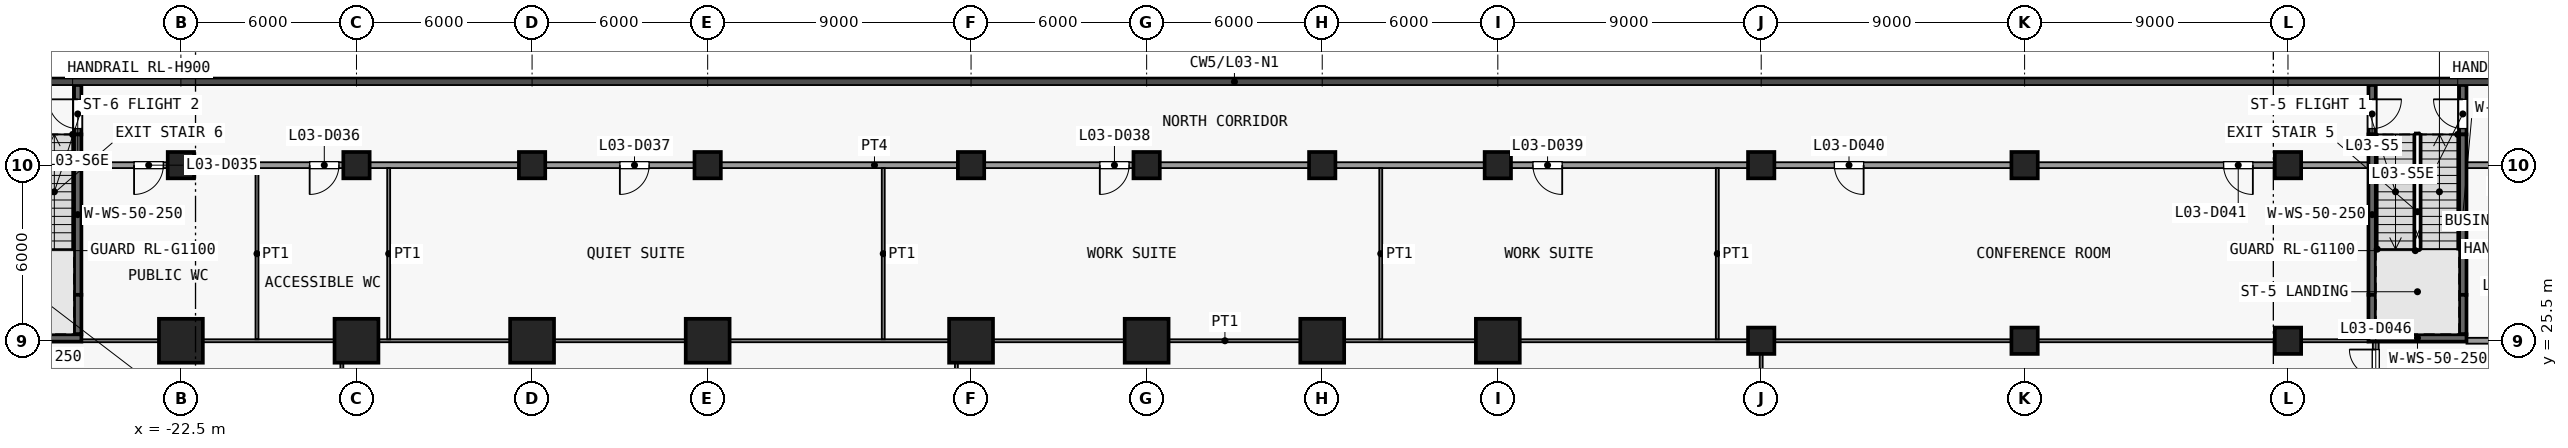
"""IFC4 building model, lengths in metres.
Left out: names, types, materials, properties, quantities, classifications, styles, units other than length and angle.
Written with IfcOpenShell. Run it as: python <this file> out.ifc"""

import sys

from ifc_helpers import new_model, si_unit, direction, frame, frame_2d, origin, origin_2d, place, context, subcontext, project, spatial, rectangle, extrude, element, fill, save


model = new_model("IFC4")
c1 = context("Model", 3, precision=1e-05, world=origin(), true_north=direction((0.0, 1.0)))
c2 = subcontext(c1, "Body", "Model", "MODEL_VIEW")
j1 = project(units=[si_unit("LENGTHUNIT", "METRE"), si_unit("PLANEANGLEUNIT", "RADIAN")], contexts=[c1])
p1 = place(None, origin())
s1 = spatial("IfcSite", under=j1, at=p1, CompositionType="ELEMENT")
p2 = place(p1, origin())
s2 = spatial("IfcBuilding", under=s1, at=p2, CompositionType="ELEMENT")
p3 = place(p2, frame((0.0, 0.0, 18.5)))
s3 = spatial("IfcBuildingStorey", under=s2, at=p3, CompositionType="ELEMENT", Elevation=18.5)
p4 = place(p3, frame((-22.5, 25.5, 0.0), z_axis=(0.0, 0.0, 1.0), x_axis=(1.0, 0.0, 0.0)))
e1 = element("IfcColumn", 1, at=p4, inside=s3, PredefinedType="COLUMN", context=c2, shape_type="SweptSolid", body=[
    extrude(rectangle(XDim=1.5, YDim=1.5, at=origin_2d()), origin(), (0.0, 0.0, 1.0), 5.0),
])
p5 = place(p3, frame((-22.5, 31.5, 0.0), z_axis=(0.0, 0.0, 1.0), x_axis=(1.0, 0.0, 0.0)))
e2 = element("IfcColumn", 2, at=p5, inside=s3, PredefinedType="COLUMN", context=c2, shape_type="SweptSolid", body=[
    extrude(rectangle(XDim=0.9, YDim=0.9, at=origin_2d()), origin(), (0.0, 0.0, 1.0), 5.0),
])
p6 = place(p3, frame((-16.5, 25.5, 0.0), z_axis=(0.0, 0.0, 1.0), x_axis=(1.0, 0.0, 0.0)))
e3 = element("IfcColumn", 3, at=p6, inside=s3, PredefinedType="COLUMN", context=c2, shape_type="SweptSolid", body=[
    extrude(rectangle(XDim=1.5, YDim=1.5, at=origin_2d()), origin(), (0.0, 0.0, 1.0), 5.0),
])
p7 = place(p3, frame((-16.5, 31.5, 0.0), z_axis=(0.0, 0.0, 1.0), x_axis=(1.0, 0.0, 0.0)))
e4 = element("IfcColumn", 4, at=p7, inside=s3, PredefinedType="COLUMN", context=c2, shape_type="SweptSolid", body=[
    extrude(rectangle(XDim=0.9, YDim=0.9, at=origin_2d()), origin(), (0.0, 0.0, 1.0), 5.0),
])
p8 = place(p3, frame((-10.5, 25.5, 0.0), z_axis=(0.0, 0.0, 1.0), x_axis=(1.0, 0.0, 0.0)))
e5 = element("IfcColumn", 5, at=p8, inside=s3, PredefinedType="COLUMN", context=c2, shape_type="SweptSolid", body=[
    extrude(rectangle(XDim=1.5, YDim=1.5, at=origin_2d()), origin(), (0.0, 0.0, 1.0), 5.0),
])
p9 = place(p3, frame((-10.5, 31.5, 0.0), z_axis=(0.0, 0.0, 1.0), x_axis=(1.0, 0.0, 0.0)))
e6 = element("IfcColumn", 6, at=p9, inside=s3, PredefinedType="COLUMN", context=c2, shape_type="SweptSolid", body=[
    extrude(rectangle(XDim=0.9, YDim=0.9, at=origin_2d()), origin(), (0.0, 0.0, 1.0), 5.0),
])
p10 = place(p3, frame((-4.5, 25.5, 0.0), z_axis=(0.0, 0.0, 1.0), x_axis=(1.0, 0.0, 0.0)))
e7 = element("IfcColumn", 7, at=p10, inside=s3, PredefinedType="COLUMN", context=c2, shape_type="SweptSolid", body=[
    extrude(rectangle(XDim=1.5, YDim=1.5, at=origin_2d()), origin(), (0.0, 0.0, 1.0), 5.0),
])
p11 = place(p3, frame((-4.5, 31.5, 0.0), z_axis=(0.0, 0.0, 1.0), x_axis=(1.0, 0.0, 0.0)))
e8 = element("IfcColumn", 8, at=p11, inside=s3, PredefinedType="COLUMN", context=c2, shape_type="SweptSolid", body=[
    extrude(rectangle(XDim=0.9, YDim=0.9, at=origin_2d()), origin(), (0.0, 0.0, 1.0), 5.0),
])
p12 = place(p3, frame((4.5, 25.5, 0.0), z_axis=(0.0, 0.0, 1.0), x_axis=(1.0, 0.0, 0.0)))
e9 = element("IfcColumn", 9, at=p12, inside=s3, PredefinedType="COLUMN", context=c2, shape_type="SweptSolid", body=[
    extrude(rectangle(XDim=1.5, YDim=1.5, at=origin_2d()), origin(), (0.0, 0.0, 1.0), 5.0),
])
p13 = place(p3, frame((4.5, 31.5, 0.0), z_axis=(0.0, 0.0, 1.0), x_axis=(1.0, 0.0, 0.0)))
e10 = element("IfcColumn", 10, at=p13, inside=s3, PredefinedType="COLUMN", context=c2, shape_type="SweptSolid", body=[
    extrude(rectangle(XDim=0.9, YDim=0.9, at=origin_2d()), origin(), (0.0, 0.0, 1.0), 5.0),
])
p14 = place(p3, frame((10.5, 25.5, 0.0), z_axis=(0.0, 0.0, 1.0), x_axis=(1.0, 0.0, 0.0)))
e11 = element("IfcColumn", 11, at=p14, inside=s3, PredefinedType="COLUMN", context=c2, shape_type="SweptSolid", body=[
    extrude(rectangle(XDim=1.5, YDim=1.5, at=origin_2d()), origin(), (0.0, 0.0, 1.0), 5.0),
])
p15 = place(p3, frame((10.5, 31.5, 0.0), z_axis=(0.0, 0.0, 1.0), x_axis=(1.0, 0.0, 0.0)))
e12 = element("IfcColumn", 12, at=p15, inside=s3, PredefinedType="COLUMN", context=c2, shape_type="SweptSolid", body=[
    extrude(rectangle(XDim=0.9, YDim=0.9, at=origin_2d()), origin(), (0.0, 0.0, 1.0), 5.0),
])
p16 = place(p3, frame((16.5, 25.5, 0.0), z_axis=(0.0, 0.0, 1.0), x_axis=(1.0, 0.0, 0.0)))
e13 = element("IfcColumn", 13, at=p16, inside=s3, PredefinedType="COLUMN", context=c2, shape_type="SweptSolid", body=[
    extrude(rectangle(XDim=1.5, YDim=1.5, at=origin_2d()), origin(), (0.0, 0.0, 1.0), 5.0),
])
p17 = place(p3, frame((16.5, 31.5, 0.0), z_axis=(0.0, 0.0, 1.0), x_axis=(1.0, 0.0, 0.0)))
e14 = element("IfcColumn", 14, at=p17, inside=s3, PredefinedType="COLUMN", context=c2, shape_type="SweptSolid", body=[
    extrude(rectangle(XDim=0.9, YDim=0.9, at=origin_2d()), origin(), (0.0, 0.0, 1.0), 5.0),
])
p18 = place(p3, frame((22.5, 25.5, 0.0), z_axis=(0.0, 0.0, 1.0), x_axis=(1.0, 0.0, 0.0)))
e15 = element("IfcColumn", 15, at=p18, inside=s3, PredefinedType="COLUMN", context=c2, shape_type="SweptSolid", body=[
    extrude(rectangle(XDim=1.5, YDim=1.5, at=origin_2d()), origin(), (0.0, 0.0, 1.0), 5.0),
])
for number, where, z_axis, x_axis in (
    (16, (22.5, 31.5, 0.0), (0.0, 0.0, 1.0), (1.0, 0.0, 0.0)),
    (17, (31.5, 25.5, 0.0), (0.0, 0.0, 1.0), (1.0, 0.0, 0.0)),
    (18, (31.5, 31.5, 0.0), (0.0, 0.0, 1.0), (1.0, 0.0, 0.0)),
    (19, (40.5, 25.5, 0.0), (0.0, 0.0, 1.0), (1.0, 0.0, 0.0)),
    (20, (40.5, 31.5, 0.0), (0.0, 0.0, 1.0), (1.0, 0.0, 0.0)),
    (21, (49.5, 25.5, 0.0), (0.0, 0.0, 1.0), (1.0, 0.0, 0.0)),
    (22, (49.5, 31.5, 0.0), (0.0, 0.0, 1.0), (1.0, 0.0, 0.0)),
):
    element("IfcColumn", number, at=place(p3, frame(where, z_axis=z_axis, x_axis=x_axis)), inside=s3, PredefinedType="COLUMN", context=c2, shape_type="SweptSolid", body=[
        extrude(rectangle(XDim=0.9, YDim=0.9, at=origin_2d()), origin(), (0.0, 0.0, 1.0), 5.0),
    ])
p19 = place(p3, frame((52.375, 34.24, 0.0), z_axis=(0.0, 0.0, 1.0), x_axis=(0.0, -1.0, 0.0)))
e23 = element("IfcWall", 23, at=p19, inside=s3, PredefinedType="SHEAR", context=c2, shape_type="SweptSolid", body=[
    extrude(rectangle(XDim=1.69, YDim=0.25, at=frame_2d((0.845, 0.0))), origin(), (0.0, 0.0, 1.0), 4.65),
])
p20 = place(p19, frame((0.49, 0.0, 0.0)))
e24 = element("IfcOpeningElement", 24, at=p20, cuts=e23, PredefinedType="OPENING", context=c2, shape_type="SweptSolid", body=[
    extrude(rectangle(XDim=1.0, YDim=2.1, at=frame_2d((0.5, 1.05))), frame((0.0, 0.135, 0.0), z_axis=(0.0, -1.0, 0.0), x_axis=(1.0, 0.0, 0.0)), (0.0, 0.0, 1.0), 0.27),
])
p21 = place(p3, frame((52.375, 27.07, 0.0), z_axis=(0.0, 0.0, 1.0), x_axis=(0.0, 1.0, 0.0)))
e25 = element("IfcWall", 25, at=p21, inside=s3, PredefinedType="SHEAR", context=c2, shape_type="SweptSolid", body=[
    extrude(rectangle(XDim=5.48, YDim=0.25, at=frame_2d((2.74, 0.0))), origin(), (0.0, 0.0, 1.0), 4.65),
])
p22 = place(p3, frame((52.375, 25.72, 0.0), z_axis=(0.0, 0.0, 1.0), x_axis=(0.0, 1.0, 0.0)))
e26 = element("IfcWall", 26, at=p22, inside=s3, PredefinedType="SHEAR", context=c2, shape_type="SweptSolid", body=[
    extrude(rectangle(XDim=1.35, YDim=0.25, at=frame_2d((0.675, 0.0))), origin(), (0.0, 0.0, 1.0), 4.65),
])
p23 = place(p3, frame((55.475, 32.55, 0.0), z_axis=(0.0, 0.0, 1.0), x_axis=(0.0, 1.0, 0.0)))
e27 = element("IfcWall", 27, at=p23, inside=s3, PredefinedType="SHEAR", context=c2, shape_type="SweptSolid", body=[
    extrude(rectangle(XDim=1.69, YDim=0.25, at=frame_2d((0.845, 0.0))), origin(), (0.0, 0.0, 1.0), 4.65),
])
p24 = place(p23, frame((0.2, 0.0, 0.0)))
e28 = element("IfcOpeningElement", 28, at=p24, cuts=e27, PredefinedType="OPENING", context=c2, shape_type="SweptSolid", body=[
    extrude(rectangle(XDim=1.0, YDim=2.1, at=frame_2d((0.5, 1.05))), frame((0.0, 0.135, 0.0), z_axis=(0.0, -1.0, 0.0), x_axis=(1.0, 0.0, 0.0)), (0.0, 0.0, 1.0), 0.27),
])
p25 = place(p3, frame((55.475, 27.07, 0.0), z_axis=(0.0, 0.0, 1.0), x_axis=(0.0, 1.0, 0.0)))
e29 = element("IfcWall", 29, at=p25, inside=s3, PredefinedType="SHEAR", context=c2, shape_type="SweptSolid", body=[
    extrude(rectangle(XDim=5.48, YDim=0.25, at=frame_2d((2.74, 0.0))), origin(), (0.0, 0.0, 1.0), 4.65),
])
p26 = place(p3, frame((55.475, 25.72, 0.0), z_axis=(0.0, 0.0, 1.0), x_axis=(0.0, 1.0, 0.0)))
e30 = element("IfcWall", 30, at=p26, inside=s3, PredefinedType="SHEAR", context=c2, shape_type="SweptSolid", body=[
    extrude(rectangle(XDim=1.35, YDim=0.25, at=frame_2d((0.675, 0.0))), origin(), (0.0, 0.0, 1.0), 4.65),
])
p27 = place(p3, frame((52.25, 25.595, 0.0), z_axis=(0.0, 0.0, 1.0), x_axis=(1.0, 0.0, 0.0)))
e31 = element("IfcWall", 31, at=p27, inside=s3, PredefinedType="SHEAR", context=c2, shape_type="SweptSolid", body=[
    extrude(rectangle(XDim=3.35, YDim=0.25, at=frame_2d((1.675, 0.0))), origin(), (0.0, 0.0, 1.0), 4.65),
])
p28 = place(p3, frame((-26.025, 32.55, 0.0), z_axis=(0.0, 0.0, 1.0), x_axis=(0.0, 1.0, 0.0)))
e32 = element("IfcWall", 32, at=p28, inside=s3, PredefinedType="SHEAR", context=c2, shape_type="SweptSolid", body=[
    extrude(rectangle(XDim=1.69, YDim=0.25, at=frame_2d((0.845, 0.0))), origin(), (0.0, 0.0, 1.0), 4.65),
])
p29 = place(p28, frame((0.2, 0.0, 0.0)))
e33 = element("IfcOpeningElement", 33, at=p29, cuts=e32, PredefinedType="OPENING", context=c2, shape_type="SweptSolid", body=[
    extrude(rectangle(XDim=1.0, YDim=2.1, at=frame_2d((0.5, 1.05))), frame((0.0, 0.135, 0.0), z_axis=(0.0, -1.0, 0.0), x_axis=(1.0, 0.0, 0.0)), (0.0, 0.0, 1.0), 0.27),
])
p30 = place(p3, frame((-26.025, 27.07, 0.0), z_axis=(0.0, 0.0, 1.0), x_axis=(0.0, 1.0, 0.0)))
e34 = element("IfcWall", 34, at=p30, inside=s3, PredefinedType="SHEAR", context=c2, shape_type="SweptSolid", body=[
    extrude(rectangle(XDim=5.48, YDim=0.25, at=frame_2d((2.74, 0.0))), origin(), (0.0, 0.0, 1.0), 4.65),
])
p31 = place(p3, frame((-26.025, 25.72, 0.0), z_axis=(0.0, 0.0, 1.0), x_axis=(0.0, 1.0, 0.0)))
e35 = element("IfcWall", 35, at=p31, inside=s3, PredefinedType="SHEAR", context=c2, shape_type="SweptSolid", body=[
    extrude(rectangle(XDim=1.35, YDim=0.25, at=frame_2d((0.675, 0.0))), origin(), (0.0, 0.0, 1.0), 4.65),
])
p32 = place(p3, frame((-29.25, 25.595, 0.0), z_axis=(0.0, 0.0, 1.0), x_axis=(1.0, 0.0, 0.0)))
e36 = element("IfcWall", 36, at=p32, inside=s3, PredefinedType="SHEAR", context=c2, shape_type="SweptSolid", body=[
    extrude(rectangle(XDim=3.35, YDim=0.25, at=frame_2d((1.675, 0.0))), origin(), (0.0, 0.0, 1.0), 4.65),
])
p33 = place(p3, frame((55.6, 25.5, 0.0), z_axis=(0.0, 0.0, 1.0), x_axis=(1.0, 0.0, 0.0)))
e37 = element("IfcWall", 37, at=p33, inside=s3, PredefinedType="PARTITIONING", context=c2, shape_type="SweptSolid", body=[
    extrude(rectangle(XDim=3.0, YDim=0.2, at=frame_2d((1.5, 0.0))), origin(), (0.0, 0.0, 1.0), 4.65),
])
p34 = place(p3, frame((-25.9, 25.5, 0.0), z_axis=(0.0, 0.0, 1.0), x_axis=(1.0, 0.0, 0.0)))
e38 = element("IfcWall", 38, at=p34, inside=s3, PredefinedType="PARTITIONING", context=c2, shape_type="SweptSolid", body=[
    extrude(rectangle(XDim=78.15, YDim=0.1, at=frame_2d((39.075, 0.0))), origin(), (0.0, 0.0, 1.0), 4.65),
])
p35 = place(p3, frame((-25.9, 31.5, 0.0), z_axis=(0.0, 0.0, 1.0), x_axis=(1.0, 0.0, 0.0)))
e39 = element("IfcWall", 39, at=p35, inside=s3, PredefinedType="PARTITIONING", context=c2, shape_type="SweptSolid", body=[
    extrude(rectangle(XDim=78.15, YDim=0.2, at=frame_2d((39.075, 0.0))), origin(), (0.0, 0.0, 1.0), 4.65),
])
p36 = place(p35, frame((1.8, 0.0, 0.0)))
e40 = element("IfcOpeningElement", 40, at=p36, cuts=e39, PredefinedType="OPENING", context=c2, shape_type="SweptSolid", body=[
    extrude(rectangle(XDim=1.0, YDim=2.1, at=frame_2d((0.5, 1.05))), frame((0.0, 0.11, 0.0), z_axis=(0.0, -1.0, 0.0), x_axis=(1.0, 0.0, 0.0)), (0.0, 0.0, 1.0), 0.22),
])
p37 = place(p35, frame((7.8, 0.0, 0.0)))
e41 = element("IfcOpeningElement", 41, at=p37, cuts=e39, PredefinedType="OPENING", context=c2, shape_type="SweptSolid", body=[
    extrude(rectangle(XDim=1.0, YDim=2.1, at=frame_2d((0.5, 1.05))), frame((0.0, 0.11, 0.0), z_axis=(0.0, -1.0, 0.0), x_axis=(1.0, 0.0, 0.0)), (0.0, 0.0, 1.0), 0.22),
])
p38 = place(p35, frame((18.4, 0.0, 0.0)))
e42 = element("IfcOpeningElement", 42, at=p38, cuts=e39, PredefinedType="OPENING", context=c2, shape_type="SweptSolid", body=[
    extrude(rectangle(XDim=1.0, YDim=2.1, at=frame_2d((0.5, 1.05))), frame((0.0, 0.11, 0.0), z_axis=(0.0, -1.0, 0.0), x_axis=(1.0, 0.0, 0.0)), (0.0, 0.0, 1.0), 0.22),
])
p39 = place(p35, frame((34.8, 0.0, 0.0)))
e43 = element("IfcOpeningElement", 43, at=p39, cuts=e39, PredefinedType="OPENING", context=c2, shape_type="SweptSolid", body=[
    extrude(rectangle(XDim=1.0, YDim=2.1, at=frame_2d((0.5, 1.05))), frame((0.0, 0.11, 0.0), z_axis=(0.0, -1.0, 0.0), x_axis=(1.0, 0.0, 0.0)), (0.0, 0.0, 1.0), 0.22),
])
p40 = place(p35, frame((49.6, 0.0, 0.0)))
e44 = element("IfcOpeningElement", 44, at=p40, cuts=e39, PredefinedType="OPENING", context=c2, shape_type="SweptSolid", body=[
    extrude(rectangle(XDim=1.0, YDim=2.1, at=frame_2d((0.5, 1.05))), frame((0.0, 0.11, 0.0), z_axis=(0.0, -1.0, 0.0), x_axis=(1.0, 0.0, 0.0)), (0.0, 0.0, 1.0), 0.22),
])
p41 = place(p35, frame((59.9, 0.0, 0.0)))
e45 = element("IfcOpeningElement", 45, at=p41, cuts=e39, PredefinedType="OPENING", context=c2, shape_type="SweptSolid", body=[
    extrude(rectangle(XDim=1.0, YDim=2.1, at=frame_2d((0.5, 1.05))), frame((0.0, 0.11, 0.0), z_axis=(0.0, -1.0, 0.0), x_axis=(1.0, 0.0, 0.0)), (0.0, 0.0, 1.0), 0.22),
])
p42 = place(p35, frame((73.2, 0.0, 0.0)))
e46 = element("IfcOpeningElement", 46, at=p42, cuts=e39, PredefinedType="OPENING", context=c2, shape_type="SweptSolid", body=[
    extrude(rectangle(XDim=1.0, YDim=2.1, at=frame_2d((0.5, 1.05))), frame((0.0, 0.11, 0.0), z_axis=(0.0, -1.0, 0.0), x_axis=(1.0, 0.0, 0.0)), (0.0, 0.0, 1.0), 0.22),
])
p43 = place(p3, frame((55.6, 31.5, 0.0), z_axis=(0.0, 0.0, 1.0), x_axis=(1.0, 0.0, 0.0)))
e47 = element("IfcWall", 47, at=p43, inside=s3, PredefinedType="PARTITIONING", context=c2, shape_type="SweptSolid", body=[
    extrude(rectangle(XDim=3.0, YDim=0.2, at=frame_2d((1.5, 0.0))), origin(), (0.0, 0.0, 1.0), 4.65),
])
for number, where, z_axis, x_axis in (
    (48, (-19.9, 25.55, 0.0), (0.0, 0.0, 1.0), (0.0, 1.0, 0.0)),
    (49, (-17.0, 19.6, 0.0), (0.0, 0.0, 1.0), (0.0, 1.0, 0.0)),
    (50, (-15.4, 25.55, 0.0), (0.0, 0.0, 1.0), (0.0, 1.0, 0.0)),
    (51, (1.5, 25.55, 0.0), (0.0, 0.0, 1.0), (0.0, 1.0, 0.0)),
    (52, (4.0, 19.6, 0.0), (0.0, 0.0, 1.0), (0.0, 1.0, 0.0)),
    (53, (18.5, 25.55, 0.0), (0.0, 0.0, 1.0), (0.0, 1.0, 0.0)),
    (54, (30.0, 25.55, 0.0), (0.0, 0.0, 1.0), (0.0, 1.0, 0.0)),
):
    element("IfcWall", number, at=place(p3, frame(where, z_axis=z_axis, x_axis=x_axis)), inside=s3, PredefinedType="PARTITIONING", context=c2, shape_type="SweptSolid", body=[
        extrude(rectangle(XDim=5.85, YDim=0.1, at=frame_2d((2.925, 0.0))), origin(), (0.0, 0.0, 1.0), 4.65),
    ])
p44 = place(p3, frame((31.5, 19.55, 0.0), z_axis=(0.0, 0.0, 1.0), x_axis=(0.0, 1.0, 0.0)))
e55 = element("IfcWall", 55, at=p44, inside=s3, PredefinedType="PARTITIONING", context=c2, shape_type="SweptSolid", body=[
    extrude(rectangle(XDim=5.9, YDim=0.1, at=frame_2d((2.95, 0.0))), origin(), (0.0, 0.0, 1.0), 4.65),
])
p45 = place(p3, frame((52.5, 16.6, 0.0), z_axis=(0.0, 0.0, 1.0), x_axis=(0.0, 1.0, 0.0)))
e56 = element("IfcWall", 56, at=p45, inside=s3, PredefinedType="PARTITIONING", context=c2, shape_type="SweptSolid", body=[
    extrude(rectangle(XDim=8.87, YDim=0.2, at=frame_2d((4.435, 0.0))), origin(), (0.0, 0.0, 1.0), 4.65),
])
p46 = place(p45, frame((0.9, 0.0, 0.0)))
e57 = element("IfcOpeningElement", 57, at=p46, cuts=e56, PredefinedType="OPENING", context=c2, shape_type="SweptSolid", body=[
    extrude(rectangle(XDim=1.0, YDim=2.1, at=frame_2d((0.5, 1.05))), frame((0.0, 0.11, 0.0), z_axis=(0.0, -1.0, 0.0), x_axis=(1.0, 0.0, 0.0)), (0.0, 0.0, 1.0), 0.22),
])
p47 = place(p45, frame((3.2, 0.0, 0.0)))
e58 = element("IfcOpeningElement", 58, at=p47, cuts=e56, PredefinedType="OPENING", context=c2, shape_type="SweptSolid", body=[
    extrude(rectangle(XDim=1.8, YDim=2.1, at=frame_2d((0.9, 1.05))), frame((0.0, 0.11, 0.0), z_axis=(0.0, -1.0, 0.0), x_axis=(1.0, 0.0, 0.0)), (0.0, 0.0, 1.0), 0.22),
])
p48 = place(p45, frame((6.8, 0.0, 0.0)))
e59 = element("IfcOpeningElement", 59, at=p48, cuts=e56, PredefinedType="OPENING", context=c2, shape_type="SweptSolid", body=[
    extrude(rectangle(XDim=1.8, YDim=2.1, at=frame_2d((0.9, 1.05))), frame((0.0, 0.11, 0.0), z_axis=(0.0, -1.0, 0.0), x_axis=(1.0, 0.0, 0.0)), (0.0, 0.0, 1.0), 0.22),
])
p49 = place(p20, origin())
e60 = element("IfcDoor", 60, at=p49, inside=s3, OperationType="SINGLE_SWING_LEFT", PredefinedType="DOOR", context=c2, shape_type="SweptSolid", body=[
    extrude(rectangle(XDim=1.0, YDim=2.1, at=frame_2d((0.5, 1.05))), frame((0.0, 0.025, 0.0), z_axis=(0.0, -1.0, 0.0), x_axis=(1.0, 0.0, 0.0)), (0.0, 0.0, 1.0), 0.05),
])
fill(e24, e60)
p50 = place(p24, origin())
e61 = element("IfcDoor", 61, at=p50, inside=s3, OperationType="SINGLE_SWING_RIGHT", PredefinedType="DOOR", context=c2, shape_type="SweptSolid", body=[
    extrude(rectangle(XDim=1.0, YDim=2.1, at=frame_2d((0.5, 1.05))), frame((0.0, 0.025, 0.0), z_axis=(0.0, -1.0, 0.0), x_axis=(1.0, 0.0, 0.0)), (0.0, 0.0, 1.0), 0.05),
])
fill(e28, e61)
p51 = place(p29, origin())
e62 = element("IfcDoor", 62, at=p51, inside=s3, OperationType="SINGLE_SWING_RIGHT", PredefinedType="DOOR", context=c2, shape_type="SweptSolid", body=[
    extrude(rectangle(XDim=1.0, YDim=2.1, at=frame_2d((0.5, 1.05))), frame((0.0, 0.025, 0.0), z_axis=(0.0, -1.0, 0.0), x_axis=(1.0, 0.0, 0.0)), (0.0, 0.0, 1.0), 0.05),
])
fill(e33, e62)
p52 = place(p36, origin())
e63 = element("IfcDoor", 63, at=p52, inside=s3, OperationType="SINGLE_SWING_LEFT", PredefinedType="DOOR", context=c2, shape_type="SweptSolid", body=[
    extrude(rectangle(XDim=1.0, YDim=2.1, at=frame_2d((0.5, 1.05))), frame((0.0, 0.025, 0.0), z_axis=(0.0, -1.0, 0.0), x_axis=(1.0, 0.0, 0.0)), (0.0, 0.0, 1.0), 0.05),
])
fill(e40, e63)
p53 = place(p37, origin())
e64 = element("IfcDoor", 64, at=p53, inside=s3, OperationType="SINGLE_SWING_LEFT", PredefinedType="DOOR", context=c2, shape_type="SweptSolid", body=[
    extrude(rectangle(XDim=1.0, YDim=2.1, at=frame_2d((0.5, 1.05))), frame((0.0, 0.025, 0.0), z_axis=(0.0, -1.0, 0.0), x_axis=(1.0, 0.0, 0.0)), (0.0, 0.0, 1.0), 0.05),
])
fill(e41, e64)
p54 = place(p38, origin())
e65 = element("IfcDoor", 65, at=p54, inside=s3, OperationType="SINGLE_SWING_LEFT", PredefinedType="DOOR", context=c2, shape_type="SweptSolid", body=[
    extrude(rectangle(XDim=1.0, YDim=2.1, at=frame_2d((0.5, 1.05))), frame((0.0, 0.025, 0.0), z_axis=(0.0, -1.0, 0.0), x_axis=(1.0, 0.0, 0.0)), (0.0, 0.0, 1.0), 0.05),
])
fill(e42, e65)
p55 = place(p39, origin())
e66 = element("IfcDoor", 66, at=p55, inside=s3, OperationType="SINGLE_SWING_LEFT", PredefinedType="DOOR", context=c2, shape_type="SweptSolid", body=[
    extrude(rectangle(XDim=1.0, YDim=2.1, at=frame_2d((0.5, 1.05))), frame((0.0, 0.025, 0.0), z_axis=(0.0, -1.0, 0.0), x_axis=(1.0, 0.0, 0.0)), (0.0, 0.0, 1.0), 0.05),
])
fill(e43, e66)
p56 = place(p40, origin())
e67 = element("IfcDoor", 67, at=p56, inside=s3, OperationType="SINGLE_SWING_RIGHT", PredefinedType="DOOR", context=c2, shape_type="SweptSolid", body=[
    extrude(rectangle(XDim=1.0, YDim=2.1, at=frame_2d((0.5, 1.05))), frame((0.0, 0.025, 0.0), z_axis=(0.0, -1.0, 0.0), x_axis=(1.0, 0.0, 0.0)), (0.0, 0.0, 1.0), 0.05),
])
fill(e44, e67)
p57 = place(p41, origin())
e68 = element("IfcDoor", 68, at=p57, inside=s3, OperationType="SINGLE_SWING_RIGHT", PredefinedType="DOOR", context=c2, shape_type="SweptSolid", body=[
    extrude(rectangle(XDim=1.0, YDim=2.1, at=frame_2d((0.5, 1.05))), frame((0.0, 0.025, 0.0), z_axis=(0.0, -1.0, 0.0), x_axis=(1.0, 0.0, 0.0)), (0.0, 0.0, 1.0), 0.05),
])
fill(e45, e68)
p58 = place(p42, origin())
e69 = element("IfcDoor", 69, at=p58, inside=s3, OperationType="SINGLE_SWING_RIGHT", PredefinedType="DOOR", context=c2, shape_type="SweptSolid", body=[
    extrude(rectangle(XDim=1.0, YDim=2.1, at=frame_2d((0.5, 1.05))), frame((0.0, 0.025, 0.0), z_axis=(0.0, -1.0, 0.0), x_axis=(1.0, 0.0, 0.0)), (0.0, 0.0, 1.0), 0.05),
])
fill(e46, e69)
p59 = place(p48, origin())
e70 = element("IfcDoor", 70, at=p59, inside=s3, OperationType="DOUBLE_DOOR_SINGLE_SWING", PredefinedType="DOOR", context=c2, shape_type="SweptSolid", body=[
    extrude(rectangle(XDim=1.8, YDim=2.1, at=frame_2d((0.9, 1.05))), frame((0.0, 0.025, 0.0), z_axis=(0.0, -1.0, 0.0), x_axis=(1.0, 0.0, 0.0)), (0.0, 0.0, 1.0), 0.05),
])
fill(e59, e70)
save(model, sys.argv[1])
